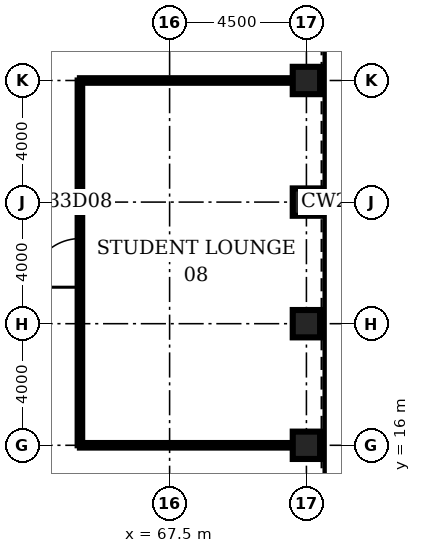
"""IFC4 building model, lengths in metres.
Left out: names, types, materials, properties, quantities, classifications, styles, units other than length and angle.
Written with IfcOpenShell. Run it as: python <this file> out.ifc"""

import sys

from ifc_helpers import new_model, si_unit, direction, frame, frame_2d, origin, origin_2d, place, context, subcontext, project, spatial, rectangle, hollow_rectangle, extrude, element, fill, save


model = new_model("IFC4")
c1 = context("Model", 3, precision=1e-05, world=origin(), true_north=direction((0.0, 1.0)))
c2 = subcontext(c1, "Body", "Model", "MODEL_VIEW")
j1 = project(units=[si_unit("LENGTHUNIT", "METRE"), si_unit("PLANEANGLEUNIT", "RADIAN")], contexts=[c1])
p1 = place(None, origin())
s1 = spatial("IfcSite", under=j1, at=p1, CompositionType="ELEMENT")
p2 = place(p1, origin())
s2 = spatial("IfcBuilding", under=s1, at=p2, CompositionType="ELEMENT")
p3 = place(p2, frame((0.0, 0.0, 150.9)))
s3 = spatial("IfcBuildingStorey", under=s2, at=p3, CompositionType="ELEMENT", Elevation=150.9)
for number, where, z_axis, x_axis in (
    (1, (72.0, 16.0, 0.0), (0.0, 0.0, 1.0), (1.0, 0.0, 0.0)),
    (2, (72.0, 20.0, 0.0), (0.0, 0.0, 1.0), (1.0, 0.0, 0.0)),
    (3, (72.0, 24.0, 0.0), (0.0, 0.0, 1.0), (1.0, 0.0, 0.0)),
    (4, (72.0, 28.0, 0.0), (0.0, 0.0, 1.0), (1.0, 0.0, 0.0)),
):
    element("IfcColumn", number, at=place(p3, frame(where, z_axis=z_axis, x_axis=x_axis)), inside=s3, PredefinedType="COLUMN", context=c2, shape_type="SweptSolid", body=[
        extrude(hollow_rectangle(XDim=0.9, YDim=0.9, WallThickness=0.1, at=origin_2d()), origin(), (0.0, 0.0, 1.0), 4.2),
    ])
for number, where, z_axis, x_axis in (
    (5, (64.55, 16.0, 0.0), (0.0, 0.0, 1.0), (1.0, 0.0, 0.0)),
    (6, (64.55, 28.0, 0.0), (0.0, 0.0, 1.0), (1.0, 0.0, 0.0)),
):
    element("IfcWall", number, at=place(p3, frame(where, z_axis=z_axis, x_axis=x_axis)), inside=s3, PredefinedType="PARTITIONING", context=c2, shape_type="SweptSolid", body=[
        extrude(rectangle(XDim=7.0, YDim=0.15, at=frame_2d((3.5, 0.0))), origin(), (0.0, 0.0, 1.0), 3.0),
    ])
p4 = place(p3, frame((64.55, 16.0, 0.0), z_axis=(0.0, 0.0, 1.0), x_axis=(0.0, 1.0, 0.0)))
e7 = element("IfcWall", 7, at=p4, inside=s3, PredefinedType="PARTITIONING", context=c2, shape_type="SweptSolid", body=[
    extrude(rectangle(XDim=12.0, YDim=0.15, at=frame_2d((6.0, 0.0))), origin(), (0.0, 0.0, 1.0), 3.0),
])
p5 = place(p4, frame((5.2, 0.0, 0.0)))
e8 = element("IfcOpeningElement", 8, at=p5, cuts=e7, PredefinedType="OPENING", context=c2, shape_type="SweptSolid", body=[
    extrude(rectangle(XDim=1.6, YDim=2.1, at=frame_2d((0.8, 1.05))), frame((0.0, 0.085, 0.0), z_axis=(0.0, -1.0, 0.0), x_axis=(1.0, 0.0, 0.0)), (0.0, 0.0, 1.0), 0.17),
])
p6 = place(p5, origin())
e9 = element("IfcDoor", 9, at=p6, inside=s3, OperationType="SINGLE_SWING_LEFT", PredefinedType="DOOR", context=c2, shape_type="SweptSolid", body=[
    extrude(rectangle(XDim=1.6, YDim=2.1, at=frame_2d((0.8, 1.05))), frame((0.0, 0.025, 0.0), z_axis=(0.0, -1.0, 0.0), x_axis=(1.0, 0.0, 0.0)), (0.0, 0.0, 1.0), 0.05),
])
fill(e8, e9)
save(model, sys.argv[1])
